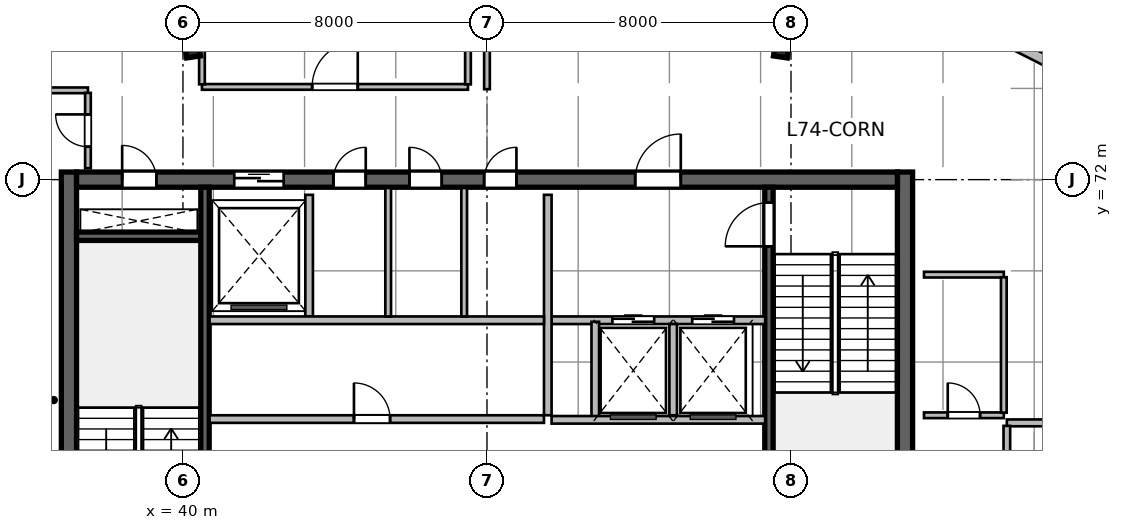
"""IFC4 building model, lengths in metres.
Left out: names, types, materials, properties, quantities, classifications, styles, units other than length and angle.
Written with IfcOpenShell. Run it as: python <this file> out.ifc"""

import sys

from ifc_helpers import new_model, si_unit, direction, frame, frame_2d, origin, origin_2d, place, context, subcontext, project, spatial, rectangle, i_section, extrude, source, transform, mapped, element, fill, save


model = new_model("IFC4")
c1 = context("Model", 3, precision=1e-05, world=origin(), true_north=direction((0.0, 1.0)))
c2 = subcontext(c1, "Body", "Model", "MODEL_VIEW")
j1 = project(units=[si_unit("LENGTHUNIT", "METRE"), si_unit("PLANEANGLEUNIT", "RADIAN")], contexts=[c1])
p1 = place(None, origin())
s1 = spatial("IfcSite", under=j1, at=p1, CompositionType="ELEMENT")
p2 = place(p1, origin())
s2 = spatial("IfcBuilding", under=s1, at=p2, CompositionType="ELEMENT")
p3 = place(p2, frame((0.0, 0.0, 303.0)))
s3 = spatial("IfcBuildingStorey", under=s2, at=p3, CompositionType="ELEMENT", Elevation=303.0)
m1 = source(origin(), c2, "Body", "SweptSolid", [
    extrude(rectangle(XDim=12.0, YDim=0.4, at=frame_2d((6.0, 0.0))), origin(), (0.0, 0.0, 1.0), 4.8),
])
for number, where, z_axis, x_axis in (
    (1, (37.0, 60.2, 0.0), (0.0, 0.0, 1.0), (0.0, 1.0, 0.0)),
    (2, (59.0, 60.2, 0.0), (0.0, 0.0, 1.0), (0.0, 1.0, 0.0)),
):
    element("IfcWall", number, at=place(p3, frame(where, z_axis=z_axis, x_axis=x_axis)), inside=s3, PredefinedType="SHEAR", context=c2, shape_type="MappedRepresentation", body=[
        mapped(m1, transform((0.0, 0.0, 0.0), scale=1.0)),
    ])
m2 = source(origin(), c2, "Body", "SweptSolid", [
    extrude(rectangle(XDim=21.6, YDim=0.4, at=frame_2d((10.8, 0.0))), origin(), (0.0, 0.0, 1.0), 4.8),
])
p4 = place(p3, frame((37.2, 72.0, 0.0), z_axis=(0.0, 0.0, 1.0), x_axis=(1.0, 0.0, 0.0)))
e3 = element("IfcWall", 3, at=p4, inside=s3, PredefinedType="SHEAR", context=c2, shape_type="MappedRepresentation", body=[
    mapped(m2, transform((0.0, 0.0, 0.0), scale=1.0)),
])
p5 = place(p4, frame((1.2, 0.0, 0.0)))
e4 = element("IfcOpeningElement", 4, at=p5, cuts=e3, PredefinedType="OPENING", context=c2, shape_type="SweptSolid", body=[
    extrude(rectangle(XDim=0.9, YDim=2.1, at=frame_2d((0.45, 1.05))), frame((0.0, 0.21, 0.0), z_axis=(0.0, -1.0, 0.0), x_axis=(1.0, 0.0, 0.0)), (0.0, 0.0, 1.0), 0.42),
])
p6 = place(p4, frame((14.7, 0.0, 0.0)))
e5 = element("IfcOpeningElement", 5, at=p6, cuts=e3, PredefinedType="OPENING", context=c2, shape_type="SweptSolid", body=[
    extrude(rectangle(XDim=1.2, YDim=2.15, at=frame_2d((0.6, 1.075))), frame((0.0, 0.21, 0.0), z_axis=(0.0, -1.0, 0.0), x_axis=(1.0, 0.0, 0.0)), (0.0, 0.0, 1.0), 0.42),
])
p7 = place(p4, frame((4.15, 0.0, 0.0)))
e6 = element("IfcOpeningElement", 6, at=p7, cuts=e3, PredefinedType="OPENING", context=c2, shape_type="SweptSolid", body=[
    extrude(rectangle(XDim=1.3, YDim=2.15, at=frame_2d((0.65, 1.075))), frame((0.0, 0.21, 0.0), z_axis=(0.0, -1.0, 0.0), x_axis=(1.0, 0.0, 0.0)), (0.0, 0.0, 1.0), 0.42),
])
p8 = place(p4, frame((6.76, 0.0, 0.0)))
e7 = element("IfcOpeningElement", 7, at=p8, cuts=e3, PredefinedType="OPENING", context=c2, shape_type="SweptSolid", body=[
    extrude(rectangle(XDim=0.85, YDim=2.1, at=frame_2d((0.425, 1.05))), frame((0.0, 0.21, 0.0), z_axis=(0.0, -1.0, 0.0), x_axis=(1.0, 0.0, 0.0)), (0.0, 0.0, 1.0), 0.42),
])
p9 = place(p4, frame((8.76, 0.0, 0.0)))
e8 = element("IfcOpeningElement", 8, at=p9, cuts=e3, PredefinedType="OPENING", context=c2, shape_type="SweptSolid", body=[
    extrude(rectangle(XDim=0.85, YDim=2.1, at=frame_2d((0.425, 1.05))), frame((0.0, 0.21, 0.0), z_axis=(0.0, -1.0, 0.0), x_axis=(1.0, 0.0, 0.0)), (0.0, 0.0, 1.0), 0.42),
])
p10 = place(p4, frame((10.725, 0.0, 0.0)))
e9 = element("IfcOpeningElement", 9, at=p10, cuts=e3, PredefinedType="OPENING", context=c2, shape_type="SweptSolid", body=[
    extrude(rectangle(XDim=0.85, YDim=2.1, at=frame_2d((0.425, 1.05))), frame((0.0, 0.21, 0.0), z_axis=(0.0, -1.0, 0.0), x_axis=(1.0, 0.0, 0.0)), (0.0, 0.0, 1.0), 0.42),
])
m3 = source(origin(), c2, "Body", "SweptSolid", [
    extrude(rectangle(XDim=3.27, YDim=0.22, at=frame_2d((1.635, 0.0))), origin(), (0.0, 0.0, 1.0), 4.8),
])
p11 = place(p3, frame((37.2, 70.51, 0.0), z_axis=(0.0, 0.0, 1.0), x_axis=(1.0, 0.0, 0.0)))
e10 = element("IfcWall", 10, at=p11, inside=s3, PredefinedType="SHEAR", context=c2, shape_type="MappedRepresentation", body=[
    mapped(m3, transform((0.0, 0.0, 0.0), scale=1.0)),
])
m4 = source(origin(), c2, "Body", "SweptSolid", [
    extrude(rectangle(XDim=11.2, YDim=0.22, at=frame_2d((5.6, 0.0))), origin(), (0.0, 0.0, 1.0), 4.8),
])
p12 = place(p3, frame((40.58, 60.6, 0.0), z_axis=(0.0, 0.0, 1.0), x_axis=(0.0, 1.0, 0.0)))
e11 = element("IfcWall", 11, at=p12, inside=s3, PredefinedType="SHEAR", context=c2, shape_type="MappedRepresentation", body=[
    mapped(m4, transform((0.0, 0.0, 0.0), scale=1.0)),
])
p13 = place(p3, frame((55.42, 60.6, 0.0), z_axis=(0.0, 0.0, 1.0), x_axis=(0.0, 1.0, 0.0)))
e12 = element("IfcWall", 12, at=p13, inside=s3, PredefinedType="SHEAR", context=c2, shape_type="MappedRepresentation", body=[
    mapped(m4, transform((0.0, 0.0, 0.0), scale=1.0)),
])
p14 = place(p13, frame((9.645, 0.0, 0.0)))
e13 = element("IfcOpeningElement", 13, at=p14, cuts=e12, PredefinedType="OPENING", context=c2, shape_type="SweptSolid", body=[
    extrude(rectangle(XDim=1.15, YDim=2.15, at=frame_2d((0.575, 1.075))), frame((0.0, 0.12, 0.0), z_axis=(0.0, -1.0, 0.0), x_axis=(1.0, 0.0, 0.0)), (0.0, 0.0, 1.0), 0.24),
])
m5 = source(origin(), c2, "Body", "SweptSolid", [
    extrude(i_section(OverallWidth=0.369, OverallDepth=0.356, WebThickness=0.011, FlangeThickness=0.018, at=origin_2d()), origin(), (0.0, 0.0, 1.0), 4.8),
])
for number, where, z_axis, x_axis in (
    (14, (40.253, 75.404, 0.0), (0.0, 0.0, 1.0), (-0.143, 0.99, 0.0)),
    (15, (55.747, 75.404, 0.0), (0.0, 0.0, 1.0), (0.143, 0.99, 0.0)),
):
    element("IfcColumn", number, at=place(p3, frame(where, z_axis=z_axis, x_axis=x_axis)), inside=s3, PredefinedType="COLUMN", context=c2, shape_type="MappedRepresentation", body=[
        mapped(m5, transform((0.0, 0.0, 0.0), scale=1.0)),
    ])
m6 = source(origin(), c2, "Body", "SweptSolid", [
    extrude(rectangle(XDim=2.706, YDim=0.28, at=frame_2d((1.353, 0.0))), origin(), (0.0, 0.0, 1.0), 4.54),
])
p15 = place(p3, frame((61.745, 75.62, 0.0), z_axis=(0.0, 0.0, 1.0), x_axis=(0.891648836287, -0.452727680564, 0.0)))
e16 = element("IfcWall", 16, at=p15, inside=s3, PredefinedType="SOLIDWALL", context=c2, shape_type="MappedRepresentation", body=[
    mapped(m6, transform((0.0, 0.0, 0.0), scale=1.0)),
])
m7 = source(origin(), c2, "Body", "SweptSolid", [
    extrude(rectangle(XDim=5.62, YDim=0.2, at=frame_2d((2.81, 0.0))), origin(), (0.0, 0.0, 1.0), 4.54),
])
p16 = place(p3, frame((49.7, 68.3, 0.0), z_axis=(0.0, 0.0, 1.0), x_axis=(1.0, 0.0, 0.0)))
e17 = element("IfcWall", 17, at=p16, inside=s3, PredefinedType="SOLIDWALL", context=c2, shape_type="MappedRepresentation", body=[
    mapped(m7, transform((0.0, 0.0, 0.0), scale=1.0)),
])
p17 = place(p16, frame((1.6, 0.0, 0.0)))
e18 = element("IfcOpeningElement", 18, at=p17, cuts=e17, PredefinedType="OPENING", context=c2, shape_type="SweptSolid", body=[
    extrude(rectangle(XDim=1.1, YDim=2.15, at=frame_2d((0.55, 1.075))), frame((0.0, 0.11, 0.0), z_axis=(0.0, -1.0, 0.0), x_axis=(1.0, 0.0, 0.0)), (0.0, 0.0, 1.0), 0.22),
])
p18 = place(p16, frame((3.7, 0.0, 0.0)))
e19 = element("IfcOpeningElement", 19, at=p18, cuts=e17, PredefinedType="OPENING", context=c2, shape_type="SweptSolid", body=[
    extrude(rectangle(XDim=1.1, YDim=2.15, at=frame_2d((0.55, 1.075))), frame((0.0, 0.11, 0.0), z_axis=(0.0, -1.0, 0.0), x_axis=(1.0, 0.0, 0.0)), (0.0, 0.0, 1.0), 0.22),
])
m8 = source(origin(), c2, "Body", "SweptSolid", [
    extrude(rectangle(XDim=5.8, YDim=0.2, at=frame_2d((2.9, 0.0))), origin(), (0.0, 0.0, 1.0), 4.54),
])
p19 = place(p3, frame((49.6, 65.8, 0.0), z_axis=(0.0, 0.0, 1.0), x_axis=(0.0, 1.0, 0.0)))
e20 = element("IfcWall", 20, at=p19, inside=s3, PredefinedType="SOLIDWALL", context=c2, shape_type="MappedRepresentation", body=[
    mapped(m8, transform((0.0, 0.0, 0.0), scale=1.0)),
])
m9 = source(origin(), c2, "Body", "SweptSolid", [
    extrude(rectangle(XDim=2.58, YDim=0.2, at=frame_2d((1.29, 0.0))), origin(), (0.0, 0.0, 1.0), 4.54),
])
p20 = place(p3, frame((50.85, 65.68, 0.0), z_axis=(0.0, 0.0, 1.0), x_axis=(0.0, 1.0, 0.0)))
e21 = element("IfcWall", 21, at=p20, inside=s3, PredefinedType="SOLIDWALL", context=c2, shape_type="MappedRepresentation", body=[
    mapped(m9, transform((0.0, 0.0, 0.0), scale=1.0)),
])
m10 = source(origin(), c2, "Body", "SweptSolid", [
    extrude(rectangle(XDim=2.4, YDim=0.2, at=frame_2d((1.2, 0.0))), origin(), (0.0, 0.0, 1.0), 4.54),
])
p21 = place(p3, frame((52.9, 65.8, 0.0), z_axis=(0.0, 0.0, 1.0), x_axis=(0.0, 1.0, 0.0)))
e22 = element("IfcWall", 22, at=p21, inside=s3, PredefinedType="SOLIDWALL", context=c2, shape_type="MappedRepresentation", body=[
    mapped(m10, transform((0.0, 0.0, 0.0), scale=1.0)),
])
p22 = place(p3, frame((49.7, 65.68, 0.0), z_axis=(0.0, 0.0, 1.0), x_axis=(1.0, 0.0, 0.0)))
e23 = element("IfcWall", 23, at=p22, inside=s3, PredefinedType="SOLIDWALL", context=c2, shape_type="MappedRepresentation", body=[
    mapped(m7, transform((0.0, 0.0, 0.0), scale=1.0)),
])
m11 = source(origin(), c2, "Body", "SweptSolid", [
    extrude(rectangle(XDim=3.2, YDim=0.2, at=frame_2d((1.6, 0.0))), origin(), (0.0, 0.0, 1.0), 4.54),
])
p23 = place(p3, frame((43.32, 68.4, 0.0), z_axis=(0.0, 0.0, 1.0), x_axis=(0.0, 1.0, 0.0)))
e24 = element("IfcWall", 24, at=p23, inside=s3, PredefinedType="SOLIDWALL", context=c2, shape_type="MappedRepresentation", body=[
    mapped(m11, transform((0.0, 0.0, 0.0), scale=1.0)),
])
m12 = source(origin(), c2, "Body", "SweptSolid", [
    extrude(rectangle(XDim=8.8, YDim=0.2, at=frame_2d((4.4, 0.0))), origin(), (0.0, 0.0, 1.0), 4.54),
])
p24 = place(p3, frame((40.7, 68.3, 0.0), z_axis=(0.0, 0.0, 1.0), x_axis=(1.0, 0.0, 0.0)))
e25 = element("IfcWall", 25, at=p24, inside=s3, PredefinedType="SOLIDWALL", context=c2, shape_type="MappedRepresentation", body=[
    mapped(m12, transform((0.0, 0.0, 0.0), scale=1.0)),
])
m13 = source(origin(), c2, "Body", "SweptSolid", [
    extrude(rectangle(XDim=3.38, YDim=0.15, at=frame_2d((1.69, 0.0))), origin(), (0.0, 0.0, 1.0), 4.54),
])
for number, where, z_axis, x_axis in (
    (26, (45.4, 68.4, 0.0), (0.0, 0.0, 1.0), (0.0, 1.0, 0.0)),
    (27, (47.4, 68.4, 0.0), (0.0, 0.0, 1.0), (0.0, 1.0, 0.0)),
):
    element("IfcWall", number, at=place(p3, frame(where, z_axis=z_axis, x_axis=x_axis)), inside=s3, PredefinedType="PARTITIONING", context=c2, shape_type="MappedRepresentation", body=[
        mapped(m13, transform((0.0, 0.0, 0.0), scale=1.0)),
    ])
p25 = place(p3, frame((40.7, 65.7, 0.0), z_axis=(0.0, 0.0, 1.0), x_axis=(1.0, 0.0, 0.0)))
e28 = element("IfcWall", 28, at=p25, inside=s3, PredefinedType="SOLIDWALL", context=c2, shape_type="MappedRepresentation", body=[
    mapped(m12, transform((0.0, 0.0, 0.0), scale=1.0)),
])
p26 = place(p25, frame((3.8, 0.0, 0.0)))
e29 = element("IfcOpeningElement", 29, at=p26, cuts=e28, PredefinedType="OPENING", context=c2, shape_type="SweptSolid", body=[
    extrude(rectangle(XDim=0.95, YDim=2.15, at=frame_2d((0.475, 1.075))), frame((0.0, 0.11, 0.0), z_axis=(0.0, -1.0, 0.0), x_axis=(1.0, 0.0, 0.0)), (0.0, 0.0, 1.0), 0.22),
])
m14 = source(origin(), c2, "Body", "SweptSolid", [
    extrude(rectangle(XDim=3.1, YDim=0.15, at=frame_2d((1.55, 0.0))), origin(), (0.0, 0.0, 1.0), 3.971),
])
p27 = place(p3, frame((34.4, 74.35, 0.0), z_axis=(0.0, 0.0, 1.0), x_axis=(1.0, 0.0, 0.0)))
e30 = element("IfcWall", 30, at=p27, inside=s3, PredefinedType="PARTITIONING", context=c2, shape_type="MappedRepresentation", body=[
    mapped(m14, transform((0.0, 0.0, 0.0), scale=1.0)),
])
m15 = source(origin(), c2, "Body", "SweptSolid", [
    extrude(rectangle(XDim=1.982, YDim=0.15, at=frame_2d((0.991, 0.0))), origin(), (0.0, 0.0, 1.0), 4.54),
])
p28 = place(p3, frame((37.5, 72.3, 0.0), z_axis=(0.0, 0.0, 1.0), x_axis=(0.0, 1.0, 0.0)))
e31 = element("IfcWall", 31, at=p28, inside=s3, PredefinedType="PARTITIONING", context=c2, shape_type="MappedRepresentation", body=[
    mapped(m15, transform((0.0, 0.0, 0.0), scale=1.0)),
])
p29 = place(p28, frame((0.566, 0.0, 0.0)))
e32 = element("IfcOpeningElement", 32, at=p29, cuts=e31, PredefinedType="OPENING", context=c2, shape_type="SweptSolid", body=[
    extrude(rectangle(XDim=0.85, YDim=2.1, at=frame_2d((0.425, 1.05))), frame((0.0, 0.085, 0.0), z_axis=(0.0, -1.0, 0.0), x_axis=(1.0, 0.0, 0.0)), (0.0, 0.0, 1.0), 0.17),
])
m16 = source(origin(), c2, "Body", "SweptSolid", [
    extrude(rectangle(XDim=2.1, YDim=0.15, at=frame_2d((1.05, 0.0))), origin(), (0.0, 0.0, 1.0), 4.54),
])
p30 = place(p3, frame((59.5, 65.8, 0.0), z_axis=(0.0, 0.0, 1.0), x_axis=(1.0, 0.0, 0.0)))
e33 = element("IfcWall", 33, at=p30, inside=s3, PredefinedType="PARTITIONING", context=c2, shape_type="MappedRepresentation", body=[
    mapped(m16, transform((0.0, 0.0, 0.0), scale=1.0)),
])
p31 = place(p30, frame((0.625, 0.0, 0.0)))
e34 = element("IfcOpeningElement", 34, at=p31, cuts=e33, PredefinedType="OPENING", context=c2, shape_type="SweptSolid", body=[
    extrude(rectangle(XDim=0.85, YDim=2.1, at=frame_2d((0.425, 1.05))), frame((0.0, 0.085, 0.0), z_axis=(0.0, -1.0, 0.0), x_axis=(1.0, 0.0, 0.0)), (0.0, 0.0, 1.0), 0.17),
])
p32 = place(p3, frame((59.5, 69.5, 0.0), z_axis=(0.0, 0.0, 1.0), x_axis=(1.0, 0.0, 0.0)))
e35 = element("IfcWall", 35, at=p32, inside=s3, PredefinedType="PARTITIONING", context=c2, shape_type="MappedRepresentation", body=[
    mapped(m16, transform((0.0, 0.0, 0.0), scale=1.0)),
])
m17 = source(origin(), c2, "Body", "SweptSolid", [
    extrude(rectangle(XDim=3.565, YDim=0.15, at=frame_2d((1.783, 0.0))), origin(), (0.0, 0.0, 1.0), 4.54),
])
p33 = place(p3, frame((61.6, 65.867, 0.0), z_axis=(0.0, 0.0, 1.0), x_axis=(0.0, 1.0, 0.0)))
e36 = element("IfcWall", 36, at=p33, inside=s3, PredefinedType="PARTITIONING", context=c2, shape_type="MappedRepresentation", body=[
    mapped(m17, transform((0.0, 0.0, 0.0), scale=1.0)),
])
m18 = source(origin(), c2, "Body", "SweptSolid", [
    extrude(rectangle(XDim=7.52, YDim=0.18, at=frame_2d((3.76, 0.0))), origin(), (0.0, 0.0, 1.0), 4.54),
])
p34 = place(p3, frame((61.68, 65.6, 0.0), z_axis=(0.0, 0.0, 1.0), x_axis=(1.0, 0.0, 0.0)))
e37 = element("IfcWall", 37, at=p34, inside=s3, PredefinedType="PLUMBINGWALL", context=c2, shape_type="MappedRepresentation", body=[
    mapped(m18, transform((0.0, 0.0, 0.0), scale=1.0)),
])
m19 = source(origin(), c2, "Body", "SweptSolid", [
    extrude(rectangle(XDim=5.042, YDim=0.175, at=frame_2d((2.521, 0.0))), origin(), (0.0, 0.0, 1.0), 4.54),
])
p35 = place(p3, frame((61.68, 60.479, 0.0), z_axis=(0.0, 0.0, 1.0), x_axis=(0.0, 1.0, 0.0)))
e38 = element("IfcWall", 38, at=p35, inside=s3, PredefinedType="PARTITIONING", context=c2, shape_type="MappedRepresentation", body=[
    mapped(m19, transform((0.0, 0.0, 0.0), scale=1.0)),
])
p36 = place(p35, frame((1.921, 0.0, 0.0)))
e39 = element("IfcOpeningElement", 39, at=p36, cuts=e38, PredefinedType="OPENING", context=c2, shape_type="SweptSolid", body=[
    extrude(rectangle(XDim=1.2, YDim=2.15, at=frame_2d((0.6, 1.075))), frame((0.0, 0.098, 0.0), z_axis=(0.0, -1.0, 0.0), x_axis=(1.0, 0.0, 0.0)), (0.0, 0.0, 1.0), 0.195),
])
m20 = source(origin(), c2, "Body", "SweptSolid", [
    extrude(rectangle(XDim=7.0, YDim=0.15, at=frame_2d((3.5, 0.0))), origin(), (0.0, 0.0, 1.0), 4.54),
])
p37 = place(p3, frame((40.5, 74.44, 0.0), z_axis=(0.0, 0.0, 1.0), x_axis=(1.0, 0.0, 0.0)))
e40 = element("IfcWall", 40, at=p37, inside=s3, PredefinedType="PARTITIONING", context=c2, shape_type="MappedRepresentation", body=[
    mapped(m20, transform((0.0, 0.0, 0.0), scale=1.0)),
])
p38 = place(p37, frame((2.9, 0.0, 0.0)))
e41 = element("IfcOpeningElement", 41, at=p38, cuts=e40, PredefinedType="OPENING", context=c2, shape_type="SweptSolid", body=[
    extrude(rectangle(XDim=1.2, YDim=2.15, at=frame_2d((0.6, 1.075))), frame((0.0, 0.085, 0.0), z_axis=(0.0, -1.0, 0.0), x_axis=(1.0, 0.0, 0.0)), (0.0, 0.0, 1.0), 0.17),
])
m21 = source(origin(), c2, "Body", "SweptSolid", [
    extrude(rectangle(XDim=2.625, YDim=0.15, at=frame_2d((1.312, 0.0))), origin(), (0.0, 0.0, 1.0), 4.54),
])
for number, where, z_axis, x_axis in (
    (42, (40.5, 74.508, 0.0), (0.0, 0.0, 1.0), (0.0, 1.0, 0.0)),
    (43, (47.5, 74.508, 0.0), (0.0, 0.0, 1.0), (0.0, 1.0, 0.0)),
):
    element("IfcWall", number, at=place(p3, frame(where, z_axis=z_axis, x_axis=x_axis)), inside=s3, PredefinedType="PARTITIONING", context=c2, shape_type="MappedRepresentation", body=[
        mapped(m21, transform((0.0, 0.0, 0.0), scale=1.0)),
    ])
m22 = source(origin(), c2, "Body", "SweptSolid", [
    extrude(rectangle(XDim=4.287, YDim=0.15, at=frame_2d((2.144, 0.0))), origin(), (0.0, 0.0, 1.0), 4.214),
])
p39 = place(p3, frame((48.0, 74.38, 0.0), z_axis=(0.0, 0.0, 1.0), x_axis=(0.0, 1.0, 0.0)))
e44 = element("IfcWall", 44, at=p39, inside=s3, PredefinedType="PARTITIONING", context=c2, shape_type="MappedRepresentation", body=[
    mapped(m22, transform((0.0, 0.0, 0.0), scale=1.0)),
])
m23 = source(origin(), c2, "Body", "SweptSolid", [
    extrude(rectangle(XDim=0.9, YDim=2.1, at=frame_2d((0.45, 1.05))), frame((0.0, 0.025, 0.0), z_axis=(0.0, -1.0, 0.0), x_axis=(1.0, 0.0, 0.0)), (0.0, 0.0, 1.0), 0.05),
])
p40 = place(p5, origin())
e45 = element("IfcDoor", 45, at=p40, inside=s3, OperationType="SINGLE_SWING_LEFT", PredefinedType="DOOR", context=c2, shape_type="MappedRepresentation", body=[
    mapped(m23, transform((0.0, 0.0, 0.0), scale=1.0)),
])
fill(e4, e45)
m24 = source(origin(), c2, "Body", "SweptSolid", [
    extrude(rectangle(XDim=1.15, YDim=2.15, at=frame_2d((0.575, 1.075))), frame((0.0, 0.025, 0.0), z_axis=(0.0, -1.0, 0.0), x_axis=(1.0, 0.0, 0.0)), (0.0, 0.0, 1.0), 0.05),
])
p41 = place(p14, origin())
e46 = element("IfcDoor", 46, at=p41, inside=s3, OperationType="SINGLE_SWING_LEFT", PredefinedType="DOOR", context=c2, shape_type="MappedRepresentation", body=[
    mapped(m24, transform((0.0, 0.0, 0.0), scale=1.0)),
])
fill(e13, e46)
m25 = source(origin(), c2, "Body", "SweptSolid", [
    extrude(rectangle(XDim=1.2, YDim=2.15, at=frame_2d((0.6, 1.075))), frame((0.0, 0.025, 0.0), z_axis=(0.0, -1.0, 0.0), x_axis=(1.0, 0.0, 0.0)), (0.0, 0.0, 1.0), 0.05),
])
p42 = place(p6, origin())
e47 = element("IfcDoor", 47, at=p42, inside=s3, OperationType="SINGLE_SWING_RIGHT", PredefinedType="DOOR", context=c2, shape_type="MappedRepresentation", body=[
    mapped(m25, transform((0.0, 0.0, 0.0), scale=1.0)),
])
fill(e5, e47)
m26 = source(origin(), c2, "Body", "SweptSolid", [
    extrude(rectangle(XDim=1.1, YDim=2.15, at=frame_2d((0.55, 1.075))), frame((0.0, 0.025, 0.0), z_axis=(0.0, -1.0, 0.0), x_axis=(1.0, 0.0, 0.0)), (0.0, 0.0, 1.0), 0.05),
])
p43 = place(p17, origin())
e48 = element("IfcDoor", 48, at=p43, inside=s3, OperationType="DOUBLE_DOOR_SLIDING", PredefinedType="DOOR", context=c2, shape_type="MappedRepresentation", body=[
    mapped(m26, transform((0.0, 0.0, 0.0), scale=1.0)),
])
fill(e18, e48)
p44 = place(p18, origin())
e49 = element("IfcDoor", 49, at=p44, inside=s3, OperationType="DOUBLE_DOOR_SLIDING", PredefinedType="DOOR", context=c2, shape_type="MappedRepresentation", body=[
    mapped(m26, transform((0.0, 0.0, 0.0), scale=1.0)),
])
fill(e19, e49)
m27 = source(origin(), c2, "Body", "SweptSolid", [
    extrude(rectangle(XDim=1.3, YDim=2.15, at=frame_2d((0.65, 1.075))), frame((0.0, 0.025, 0.0), z_axis=(0.0, -1.0, 0.0), x_axis=(1.0, 0.0, 0.0)), (0.0, 0.0, 1.0), 0.05),
])
p45 = place(p7, origin())
e50 = element("IfcDoor", 50, at=p45, inside=s3, OperationType="DOUBLE_DOOR_SLIDING", PredefinedType="DOOR", context=c2, shape_type="MappedRepresentation", body=[
    mapped(m27, transform((0.0, 0.0, 0.0), scale=1.0)),
])
fill(e6, e50)
m28 = source(origin(), c2, "Body", "SweptSolid", [
    extrude(rectangle(XDim=0.85, YDim=2.1, at=frame_2d((0.425, 1.05))), frame((0.0, 0.025, 0.0), z_axis=(0.0, -1.0, 0.0), x_axis=(1.0, 0.0, 0.0)), (0.0, 0.0, 1.0), 0.05),
])
p46 = place(p8, origin())
e51 = element("IfcDoor", 51, at=p46, inside=s3, OperationType="SINGLE_SWING_RIGHT", PredefinedType="DOOR", context=c2, shape_type="MappedRepresentation", body=[
    mapped(m28, transform((0.0, 0.0, 0.0), scale=1.0)),
])
fill(e7, e51)
p47 = place(p9, origin())
e52 = element("IfcDoor", 52, at=p47, inside=s3, OperationType="SINGLE_SWING_LEFT", PredefinedType="DOOR", context=c2, shape_type="MappedRepresentation", body=[
    mapped(m28, transform((0.0, 0.0, 0.0), scale=1.0)),
])
fill(e8, e52)
p48 = place(p10, origin())
e53 = element("IfcDoor", 53, at=p48, inside=s3, OperationType="SINGLE_SWING_RIGHT", PredefinedType="DOOR", context=c2, shape_type="MappedRepresentation", body=[
    mapped(m28, transform((0.0, 0.0, 0.0), scale=1.0)),
])
fill(e9, e53)
m29 = source(origin(), c2, "Body", "SweptSolid", [
    extrude(rectangle(XDim=0.95, YDim=2.15, at=frame_2d((0.475, 1.075))), frame((0.0, 0.025, 0.0), z_axis=(0.0, -1.0, 0.0), x_axis=(1.0, 0.0, 0.0)), (0.0, 0.0, 1.0), 0.05),
])
p49 = place(p26, origin())
e54 = element("IfcDoor", 54, at=p49, inside=s3, OperationType="SINGLE_SWING_LEFT", PredefinedType="DOOR", context=c2, shape_type="MappedRepresentation", body=[
    mapped(m29, transform((0.0, 0.0, 0.0), scale=1.0)),
])
fill(e29, e54)
p50 = place(p29, origin())
e55 = element("IfcDoor", 55, at=p50, inside=s3, OperationType="SINGLE_SWING_RIGHT", PredefinedType="DOOR", context=c2, shape_type="MappedRepresentation", body=[
    mapped(m28, transform((0.0, 0.0, 0.0), scale=1.0)),
])
fill(e32, e55)
p51 = place(p31, origin())
e56 = element("IfcDoor", 56, at=p51, inside=s3, OperationType="SINGLE_SWING_LEFT", PredefinedType="DOOR", context=c2, shape_type="MappedRepresentation", body=[
    mapped(m28, transform((0.0, 0.0, 0.0), scale=1.0)),
])
fill(e34, e56)
m30 = source(origin(), c2, "Body", "SweptSolid", [
    extrude(rectangle(XDim=1.2, YDim=2.15, at=frame_2d((0.6, 1.075))), frame((0.0, 0.025, 0.0), z_axis=(0.0, -1.0, 0.0), x_axis=(1.0, 0.0, 0.0)), (0.0, 0.0, 1.0), 0.05),
])
p52 = place(p38, origin())
e57 = element("IfcDoor", 57, at=p52, inside=s3, OperationType="SINGLE_SWING_RIGHT", PredefinedType="DOOR", context=c2, shape_type="MappedRepresentation", body=[
    mapped(m30, transform((0.0, 0.0, 0.0), scale=1.0)),
])
fill(e41, e57)
save(model, sys.argv[1])
